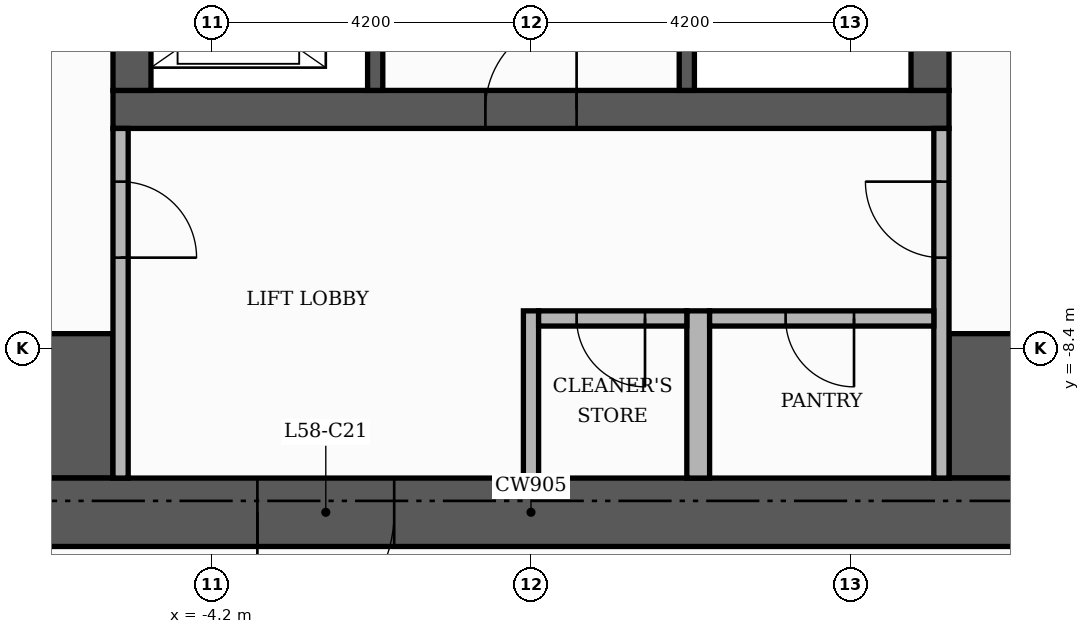
"""IFC4 building model, lengths in metres.
Left out: names, types, materials, properties, quantities, classifications, styles, units other than length and angle.
Written with IfcOpenShell. Run it as: python <this file> out.ifc"""

import sys

from ifc_helpers import new_model, si_unit, direction, frame, frame_2d, origin, place, context, subcontext, project, spatial, rectangle, extrude, element, fill, save


model = new_model("IFC4")
c1 = context("Model", 3, precision=1e-05, world=origin(), true_north=direction((0.0, 1.0)))
c2 = subcontext(c1, "Body", "Model", "MODEL_VIEW")
j1 = project(units=[si_unit("LENGTHUNIT", "METRE"), si_unit("PLANEANGLEUNIT", "RADIAN")], contexts=[c1])
p1 = place(None, origin())
s1 = spatial("IfcSite", under=j1, at=p1, CompositionType="ELEMENT")
p2 = place(p1, origin())
s2 = spatial("IfcBuilding", under=s1, at=p2, CompositionType="ELEMENT")
p3 = place(p2, frame((0.0, 0.0, 244.5)))
s3 = spatial("IfcBuildingStorey", under=s2, at=p3, CompositionType="ELEMENT", Elevation=244.5)
p4 = place(p3, frame((-5.5, -5.25, 0.0), z_axis=(0.0, 0.0, 1.0), x_axis=(1.0, 0.0, 0.0)))
e1 = element("IfcWall", 1, at=p4, inside=s3, PredefinedType="SHEAR", context=c2, shape_type="SweptSolid", body=[
    extrude(rectangle(XDim=11.0, YDim=0.5, at=frame_2d((5.5, 0.0))), origin(), (0.0, 0.0, 1.0), 3.48),
])
p5 = place(p4, frame((4.9, 0.0, 0.0)))
e2 = element("IfcOpeningElement", 2, at=p5, cuts=e1, PredefinedType="OPENING", context=c2, shape_type="SweptSolid", body=[
    extrude(rectangle(XDim=1.2, YDim=2.1, at=frame_2d((0.6, 1.05))), frame((0.0, 0.26, 0.0), z_axis=(0.0, -1.0, 0.0), x_axis=(1.0, 0.0, 0.0)), (0.0, 0.0, 1.0), 0.52),
])
for number, where, z_axis, x_axis in (
    (3, (-5.25, -5.0, 0.0), (0.0, 0.0, 1.0), (0.0, 1.0, 0.0)),
    (4, (5.25, -5.0, 0.0), (0.0, 0.0, 1.0), (0.0, 1.0, 0.0)),
):
    element("IfcWall", number, at=place(p3, frame(where, z_axis=z_axis, x_axis=x_axis)), inside=s3, PredefinedType="SHEAR", context=c2, shape_type="SweptSolid", body=[
        extrude(rectangle(XDim=10.5, YDim=0.5, at=frame_2d((5.25, 0.0))), origin(), (0.0, 0.0, 1.0), 3.48),
    ])
for number, where, z_axis, x_axis in (
    (5, (-10.1, -9.15, 0.0), (0.0, 0.0, 1.0), (1.0, 0.0, 0.0)),
    (6, (5.5, -9.15, 0.0), (0.0, 0.0, 1.0), (1.0, 0.0, 0.0)),
):
    element("IfcWall", number, at=place(p3, frame(where, z_axis=z_axis, x_axis=x_axis)), inside=s3, PredefinedType="SHEAR", context=c2, shape_type="SweptSolid", body=[
        extrude(rectangle(XDim=4.6, YDim=1.9, at=frame_2d((2.3, 0.0))), origin(), (0.0, 0.0, 1.0), 3.48),
    ])
p6 = place(p3, frame((2.05, -5.0, 0.0), z_axis=(0.0, 0.0, 1.0), x_axis=(0.0, 1.0, 0.0)))
e7 = element("IfcWall", 7, at=p6, inside=s3, PredefinedType="SHEAR", context=c2, shape_type="SweptSolid", body=[
    extrude(rectangle(XDim=6.6, YDim=0.2, at=frame_2d((3.3, 0.0))), origin(), (0.0, 0.0, 1.0), 3.48),
])
p7 = place(p6, frame((5.25, 0.0, 0.0)))
e8 = element("IfcOpeningElement", 8, at=p7, cuts=e7, PredefinedType="OPENING", context=c2, shape_type="SweptSolid", body=[
    extrude(rectangle(XDim=1.0, YDim=2.1, at=frame_2d((0.5, 1.05))), frame((0.0, 0.11, 0.0), z_axis=(0.0, -1.0, 0.0), x_axis=(1.0, 0.0, 0.0)), (0.0, 0.0, 1.0), 0.22),
])
p8 = place(p3, frame((-2.05, -5.0, 0.0), z_axis=(0.0, 0.0, 1.0), x_axis=(0.0, 1.0, 0.0)))
e9 = element("IfcWall", 9, at=p8, inside=s3, PredefinedType="SHEAR", context=c2, shape_type="SweptSolid", body=[
    extrude(rectangle(XDim=3.4, YDim=0.2, at=frame_2d((1.7, 0.0))), origin(), (0.0, 0.0, 1.0), 3.48),
])
p9 = place(p8, frame((0.55, 0.0, 0.0)))
e10 = element("IfcOpeningElement", 10, at=p9, cuts=e9, PredefinedType="OPENING", context=c2, shape_type="SweptSolid", body=[
    extrude(rectangle(XDim=1.1, YDim=2.1, at=frame_2d((0.55, 1.05))), frame((0.0, 0.11, 0.0), z_axis=(0.0, -1.0, 0.0), x_axis=(1.0, 0.0, 0.0)), (0.0, 0.0, 1.0), 0.22),
])
p10 = place(p8, frame((2.45, 0.0, 0.0)))
e11 = element("IfcOpeningElement", 11, at=p10, cuts=e9, PredefinedType="OPENING", context=c2, shape_type="SweptSolid", body=[
    extrude(rectangle(XDim=0.8, YDim=2.1, at=frame_2d((0.4, 1.05))), frame((0.0, 0.11, 0.0), z_axis=(0.0, -1.0, 0.0), x_axis=(1.0, 0.0, 0.0)), (0.0, 0.0, 1.0), 0.22),
])
p11 = place(p3, frame((-11.0, -10.55, 0.0), z_axis=(0.0, 0.0, 1.0), x_axis=(1.0, 0.0, 0.0)))
e12 = element("IfcWall", 12, at=p11, inside=s3, PredefinedType="SHEAR", context=c2, shape_type="SweptSolid", body=[
    extrude(rectangle(XDim=22.0, YDim=0.9, at=frame_2d((11.0, 0.0))), origin(), (0.0, 0.0, 1.0), 3.48),
])
p12 = place(p11, frame((7.4, 0.0, 0.0)))
e13 = element("IfcOpeningElement", 13, at=p12, cuts=e12, PredefinedType="OPENING", context=c2, shape_type="SweptSolid", body=[
    extrude(rectangle(XDim=1.8, YDim=2.2, at=frame_2d((0.9, 1.1))), frame((0.0, 0.46, 0.0), z_axis=(0.0, -1.0, 0.0), x_axis=(1.0, 0.0, 0.0)), (0.0, 0.0, 1.0), 0.92),
])
p13 = place(p3, frame((-5.4, -10.1, 0.0), z_axis=(0.0, 0.0, 1.0), x_axis=(0.0, 1.0, 0.0)))
e14 = element("IfcWall", 14, at=p13, inside=s3, PredefinedType="PARTITIONING", context=c2, shape_type="SweptSolid", body=[
    extrude(rectangle(XDim=4.6, YDim=0.2, at=frame_2d((2.3, 0.0))), origin(), (0.0, 0.0, 1.0), 3.48),
])
p14 = place(p13, frame((2.9, 0.0, 0.0)))
e15 = element("IfcOpeningElement", 15, at=p14, cuts=e14, PredefinedType="OPENING", context=c2, shape_type="SweptSolid", body=[
    extrude(rectangle(XDim=1.0, YDim=2.1, at=frame_2d((0.5, 1.05))), frame((0.0, 0.11, 0.0), z_axis=(0.0, -1.0, 0.0), x_axis=(1.0, 0.0, 0.0)), (0.0, 0.0, 1.0), 0.22),
])
p15 = place(p3, frame((0.0, -10.1, 0.0), z_axis=(0.0, 0.0, 1.0), x_axis=(0.0, 1.0, 0.0)))
e16 = element("IfcWall", 16, at=p15, inside=s3, PredefinedType="PARTITIONING", context=c2, shape_type="SweptSolid", body=[
    extrude(rectangle(XDim=2.2, YDim=0.2, at=frame_2d((1.1, 0.0))), origin(), (0.0, 0.0, 1.0), 3.48),
])
p16 = place(p3, frame((2.2, -10.1, 0.0), z_axis=(0.0, 0.0, 1.0), x_axis=(0.0, 1.0, 0.0)))
e17 = element("IfcWall", 17, at=p16, inside=s3, PredefinedType="PARTITIONING", context=c2, shape_type="SweptSolid", body=[
    extrude(rectangle(XDim=2.2, YDim=0.3, at=frame_2d((1.1, 0.0))), origin(), (0.0, 0.0, 1.0), 3.48),
])
p17 = place(p3, frame((5.4, -10.1, 0.0), z_axis=(0.0, 0.0, 1.0), x_axis=(0.0, 1.0, 0.0)))
e18 = element("IfcWall", 18, at=p17, inside=s3, PredefinedType="PARTITIONING", context=c2, shape_type="SweptSolid", body=[
    extrude(rectangle(XDim=4.6, YDim=0.2, at=frame_2d((2.3, 0.0))), origin(), (0.0, 0.0, 1.0), 3.48),
])
p18 = place(p17, frame((2.9, 0.0, 0.0)))
e19 = element("IfcOpeningElement", 19, at=p18, cuts=e18, PredefinedType="OPENING", context=c2, shape_type="SweptSolid", body=[
    extrude(rectangle(XDim=1.0, YDim=2.1, at=frame_2d((0.5, 1.05))), frame((0.0, 0.11, 0.0), z_axis=(0.0, -1.0, 0.0), x_axis=(1.0, 0.0, 0.0)), (0.0, 0.0, 1.0), 0.22),
])
p19 = place(p3, frame((0.1, -8.0, 0.0), z_axis=(0.0, 0.0, 1.0), x_axis=(1.0, 0.0, 0.0)))
e20 = element("IfcWall", 20, at=p19, inside=s3, PredefinedType="PARTITIONING", context=c2, shape_type="SweptSolid", body=[
    extrude(rectangle(XDim=1.95, YDim=0.2, at=frame_2d((0.975, 0.0))), origin(), (0.0, 0.0, 1.0), 3.48),
])
p20 = place(p19, frame((0.5, 0.0, 0.0)))
e21 = element("IfcOpeningElement", 21, at=p20, cuts=e20, PredefinedType="OPENING", context=c2, shape_type="SweptSolid", body=[
    extrude(rectangle(XDim=0.9, YDim=2.1, at=frame_2d((0.45, 1.05))), frame((0.0, 0.11, 0.0), z_axis=(0.0, -1.0, 0.0), x_axis=(1.0, 0.0, 0.0)), (0.0, 0.0, 1.0), 0.22),
])
p21 = place(p3, frame((2.35, -8.0, 0.0), z_axis=(0.0, 0.0, 1.0), x_axis=(1.0, 0.0, 0.0)))
e22 = element("IfcWall", 22, at=p21, inside=s3, PredefinedType="PARTITIONING", context=c2, shape_type="SweptSolid", body=[
    extrude(rectangle(XDim=2.95, YDim=0.2, at=frame_2d((1.475, 0.0))), origin(), (0.0, 0.0, 1.0), 3.48),
])
p22 = place(p21, frame((1.0, 0.0, 0.0)))
e23 = element("IfcOpeningElement", 23, at=p22, cuts=e22, PredefinedType="OPENING", context=c2, shape_type="SweptSolid", body=[
    extrude(rectangle(XDim=0.9, YDim=2.1, at=frame_2d((0.45, 1.05))), frame((0.0, 0.11, 0.0), z_axis=(0.0, -1.0, 0.0), x_axis=(1.0, 0.0, 0.0)), (0.0, 0.0, 1.0), 0.22),
])
p23 = place(p5, origin())
e24 = element("IfcDoor", 24, at=p23, inside=s3, OperationType="SINGLE_SWING_RIGHT", PredefinedType="DOOR", context=c2, shape_type="SweptSolid", body=[
    extrude(rectangle(XDim=1.2, YDim=2.1, at=frame_2d((0.6, 1.05))), frame((0.0, 0.025, 0.0), z_axis=(0.0, -1.0, 0.0), x_axis=(1.0, 0.0, 0.0)), (0.0, 0.0, 1.0), 0.05),
])
fill(e2, e24)
p24 = place(p14, frame((1.0, 0.0, 0.0), z_axis=(0.0, 0.0, 1.0), x_axis=(-1.0, 0.0, 0.0)))
e25 = element("IfcDoor", 25, at=p24, inside=s3, OperationType="SINGLE_SWING_LEFT", PredefinedType="DOOR", context=c2, shape_type="SweptSolid", body=[
    extrude(rectangle(XDim=1.0, YDim=2.1, at=frame_2d((0.5, 1.05))), frame((0.0, 0.025, 0.0), z_axis=(0.0, -1.0, 0.0), x_axis=(1.0, 0.0, 0.0)), (0.0, 0.0, 1.0), 0.05),
])
fill(e15, e25)
p25 = place(p18, origin())
e26 = element("IfcDoor", 26, at=p25, inside=s3, OperationType="SINGLE_SWING_RIGHT", PredefinedType="DOOR", context=c2, shape_type="SweptSolid", body=[
    extrude(rectangle(XDim=1.0, YDim=2.1, at=frame_2d((0.5, 1.05))), frame((0.0, 0.025, 0.0), z_axis=(0.0, -1.0, 0.0), x_axis=(1.0, 0.0, 0.0)), (0.0, 0.0, 1.0), 0.05),
])
fill(e19, e26)
p26 = place(p12, frame((1.8, 0.0, 0.0), z_axis=(0.0, 0.0, 1.0), x_axis=(-1.0, 0.0, 0.0)))
e27 = element("IfcDoor", 27, at=p26, inside=s3, OperationType="DOUBLE_DOOR_SINGLE_SWING", PredefinedType="DOOR", context=c2, shape_type="SweptSolid", body=[
    extrude(rectangle(XDim=1.8, YDim=2.2, at=frame_2d((0.9, 1.1))), frame((0.0, 0.025, 0.0), z_axis=(0.0, -1.0, 0.0), x_axis=(1.0, 0.0, 0.0)), (0.0, 0.0, 1.0), 0.05),
])
fill(e13, e27)
p27 = place(p20, frame((0.9, 0.0, 0.0), z_axis=(0.0, 0.0, 1.0), x_axis=(-1.0, 0.0, 0.0)))
e28 = element("IfcDoor", 28, at=p27, inside=s3, OperationType="SINGLE_SWING_RIGHT", PredefinedType="DOOR", context=c2, shape_type="SweptSolid", body=[
    extrude(rectangle(XDim=0.9, YDim=2.1, at=frame_2d((0.45, 1.05))), frame((0.0, 0.025, 0.0), z_axis=(0.0, -1.0, 0.0), x_axis=(1.0, 0.0, 0.0)), (0.0, 0.0, 1.0), 0.05),
])
fill(e21, e28)
p28 = place(p22, frame((0.9, 0.0, 0.0), z_axis=(0.0, 0.0, 1.0), x_axis=(-1.0, 0.0, 0.0)))
e29 = element("IfcDoor", 29, at=p28, inside=s3, OperationType="SINGLE_SWING_RIGHT", PredefinedType="DOOR", context=c2, shape_type="SweptSolid", body=[
    extrude(rectangle(XDim=0.9, YDim=2.1, at=frame_2d((0.45, 1.05))), frame((0.0, 0.025, 0.0), z_axis=(0.0, -1.0, 0.0), x_axis=(1.0, 0.0, 0.0)), (0.0, 0.0, 1.0), 0.05),
])
fill(e23, e29)
save(model, sys.argv[1])
